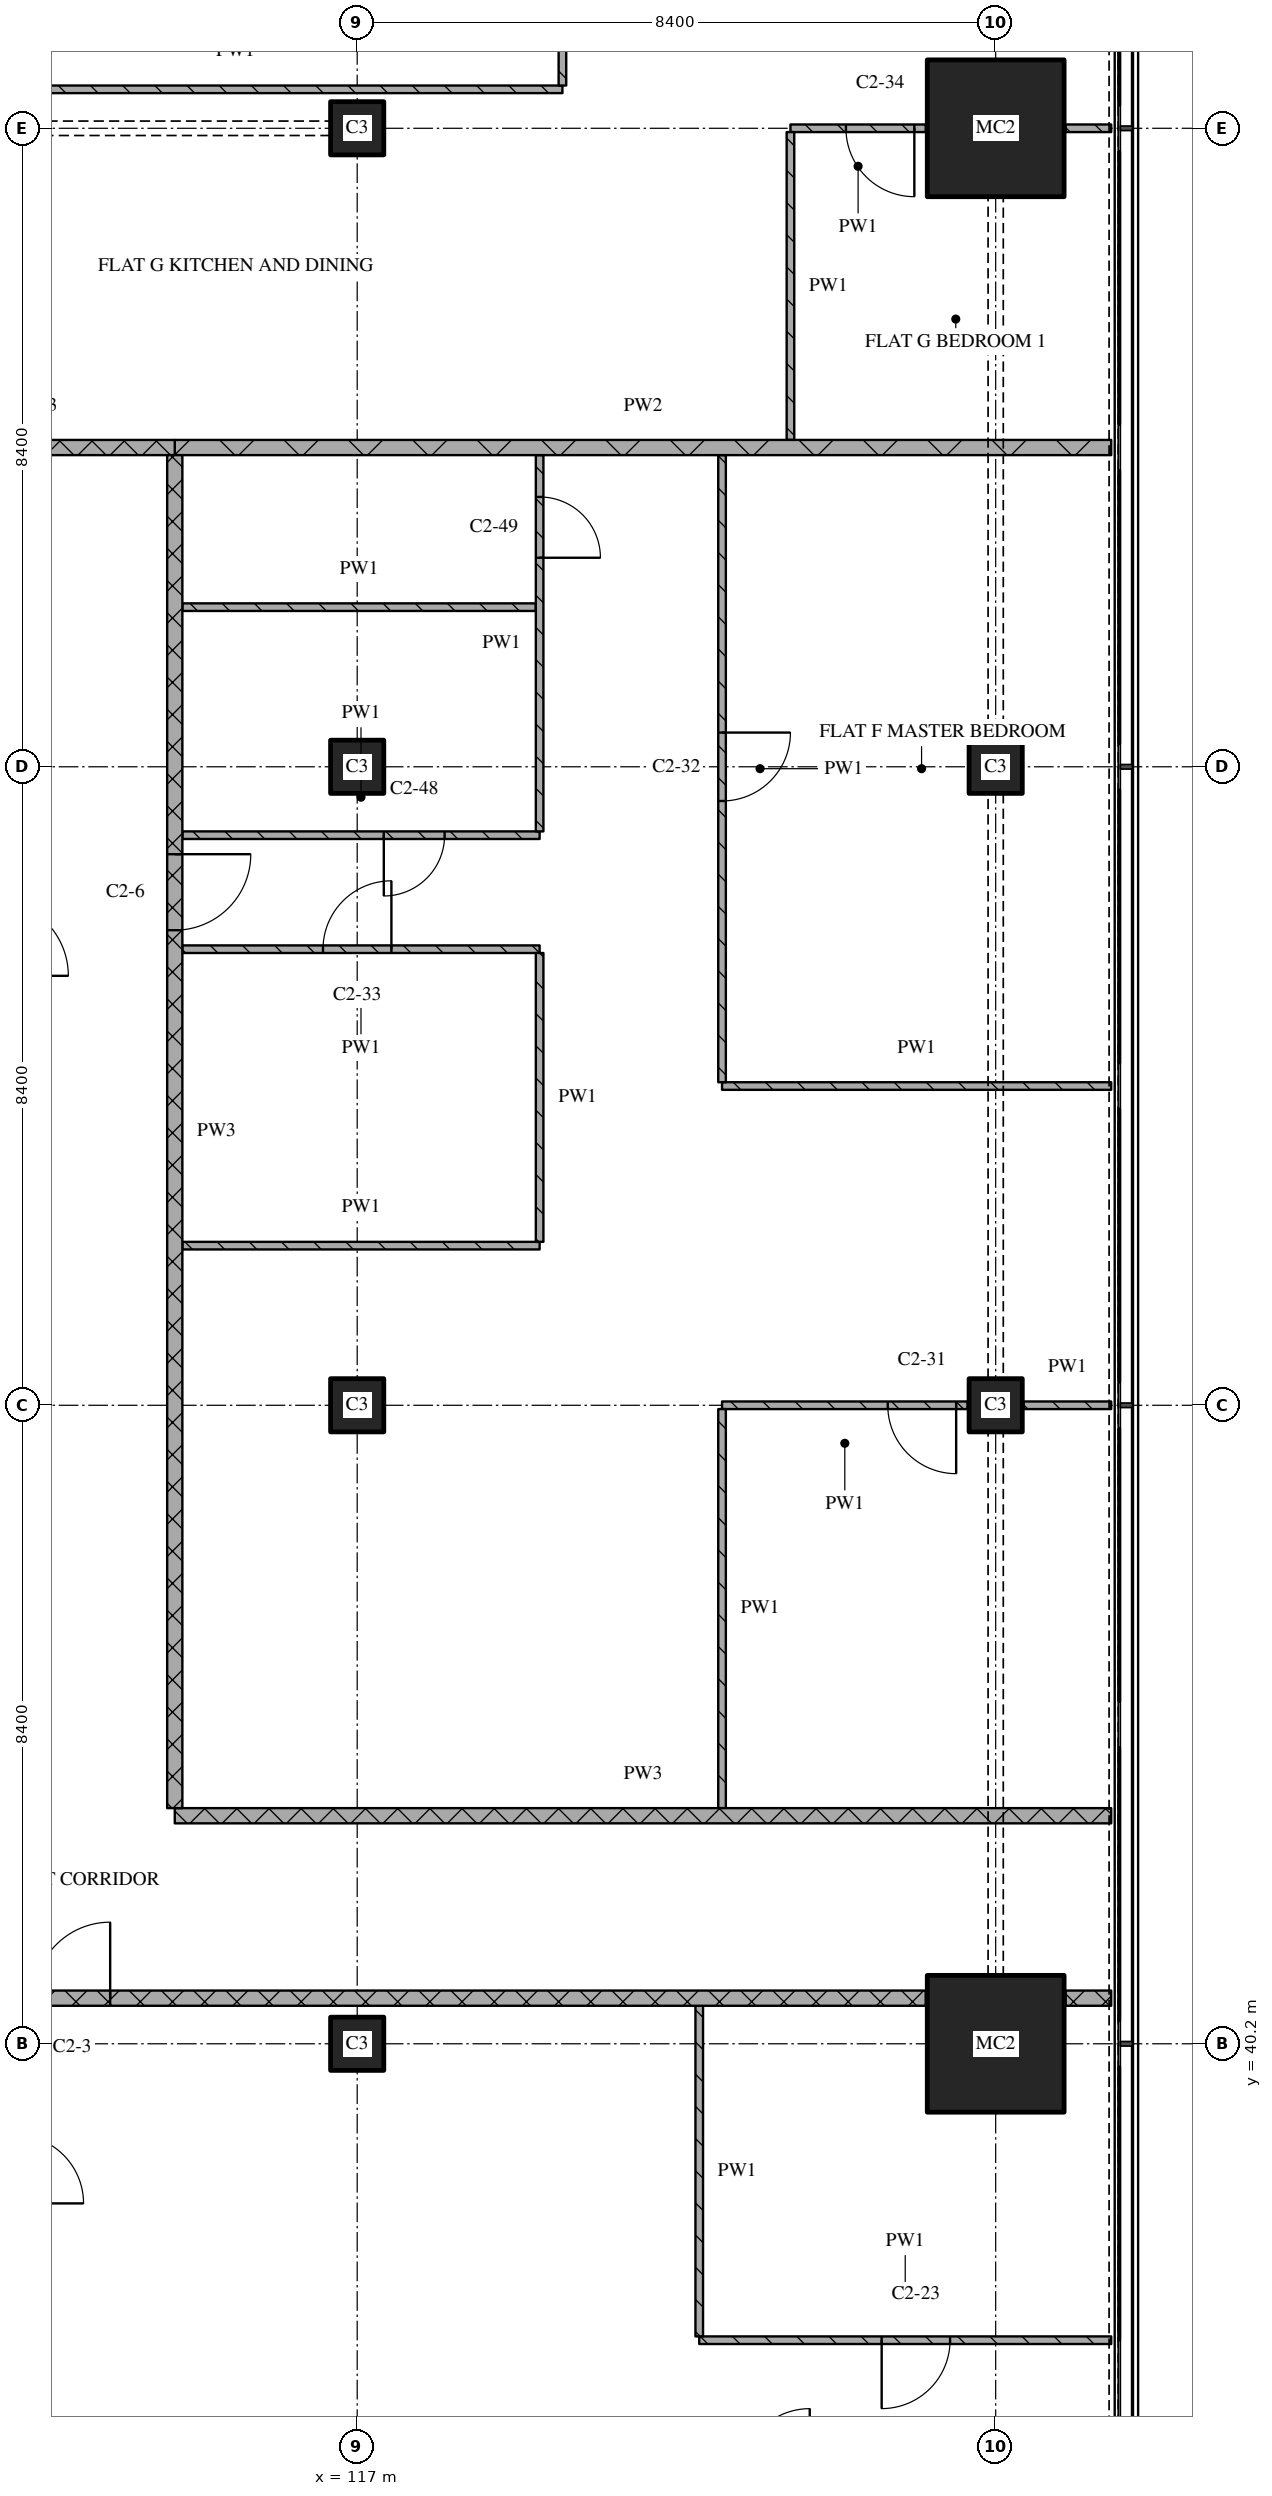
"""IFC4 building model, lengths in metres.
Left out: names, types, materials, properties, quantities, classifications, styles, units other than length and angle.
Written with IfcOpenShell. Run it as: python <this file> out.ifc"""

import sys

from ifc_helpers import new_model, si_unit, direction, frame, frame_2d, origin, origin_2d, place, context, subcontext, project, spatial, rectangle, extrude, element, fill, save


model = new_model("IFC4")
c1 = context("Model", 3, precision=1e-05, world=origin(), true_north=direction((0.0, 1.0)))
c2 = subcontext(c1, "Body", "Model", "MODEL_VIEW")
j1 = project(units=[si_unit("LENGTHUNIT", "METRE"), si_unit("PLANEANGLEUNIT", "RADIAN")], contexts=[c1])
p1 = place(None, origin())
s1 = spatial("IfcSite", under=j1, at=p1, CompositionType="ELEMENT")
p2 = place(p1, origin())
s2 = spatial("IfcBuilding", under=s1, at=p2, CompositionType="ELEMENT")
p3 = place(p2, frame((0.0, 0.0, 161.85)))
s3 = spatial("IfcBuildingStorey", under=s2, at=p3, CompositionType="ELEMENT", Elevation=161.85)
for number, where, z_axis, x_axis in (
    (1, (117.0, 40.2, 0.0), (0.0, 0.0, 1.0), (1.0, 0.0, 0.0)),
    (2, (117.0, 48.6, 0.0), (0.0, 0.0, 1.0), (1.0, 0.0, 0.0)),
    (3, (117.0, 57.0, 0.0), (0.0, 0.0, 1.0), (1.0, 0.0, 0.0)),
    (4, (117.0, 65.4, 0.0), (0.0, 0.0, 1.0), (1.0, 0.0, 0.0)),
):
    element("IfcColumn", number, at=place(p3, frame(where, z_axis=z_axis, x_axis=x_axis)), inside=s3, PredefinedType="COLUMN", context=c2, shape_type="SweptSolid", body=[
        extrude(rectangle(XDim=0.7, YDim=0.7, at=origin_2d()), origin(), (0.0, 0.0, 1.0), 3.6),
    ])
p4 = place(p3, frame((125.4, 40.2, 0.0), z_axis=(0.0, 0.0, 1.0), x_axis=(1.0, 0.0, 0.0)))
e5 = element("IfcColumn", 5, at=p4, inside=s3, PredefinedType="COLUMN", context=c2, shape_type="SweptSolid", body=[
    extrude(rectangle(XDim=1.8, YDim=1.8, at=origin_2d()), origin(), (0.0, 0.0, 1.0), 3.6),
])
for number, where, z_axis, x_axis in (
    (6, (125.4, 48.6, 0.0), (0.0, 0.0, 1.0), (1.0, 0.0, 0.0)),
    (7, (125.4, 57.0, 0.0), (0.0, 0.0, 1.0), (1.0, 0.0, 0.0)),
):
    element("IfcColumn", number, at=place(p3, frame(where, z_axis=z_axis, x_axis=x_axis)), inside=s3, PredefinedType="COLUMN", context=c2, shape_type="SweptSolid", body=[
        extrude(rectangle(XDim=0.7, YDim=0.7, at=origin_2d()), origin(), (0.0, 0.0, 1.0), 3.6),
    ])
p5 = place(p3, frame((125.4, 65.4, 0.0), z_axis=(0.0, 0.0, 1.0), x_axis=(1.0, 0.0, 0.0)))
e8 = element("IfcColumn", 8, at=p5, inside=s3, PredefinedType="COLUMN", context=c2, shape_type="SweptSolid", body=[
    extrude(rectangle(XDim=1.8, YDim=1.8, at=origin_2d()), origin(), (0.0, 0.0, 1.0), 3.6),
])
p6 = place(p3, frame((121.5, 36.3, 0.0), z_axis=(0.0, 0.0, 1.0), x_axis=(1.0, 0.0, 0.0)))
e9 = element("IfcWall", 9, at=p6, inside=s3, PredefinedType="PARTITIONING", context=c2, shape_type="SweptSolid", body=[
    extrude(rectangle(XDim=5.42, YDim=0.1, at=frame_2d((2.71, 0.0))), origin(), (0.0, 0.0, 1.0), 3.32),
])
p7 = place(p6, frame((2.4, 0.0, 0.0)))
e10 = element("IfcOpeningElement", 10, at=p7, cuts=e9, PredefinedType="OPENING", context=c2, shape_type="SweptSolid", body=[
    extrude(rectangle(XDim=0.9, YDim=2.1, at=frame_2d((0.45, 1.05))), frame((0.0, 0.06, 0.0), z_axis=(0.0, -1.0, 0.0), x_axis=(1.0, 0.0, 0.0)), (0.0, 0.0, 1.0), 0.12),
])
p8 = place(p3, frame((124.48, 40.8, 0.0), z_axis=(0.0, 0.0, 1.0), x_axis=(-1.0, 0.0, 0.0)))
e11 = element("IfcWall", 11, at=p8, inside=s3, PredefinedType="PARTITIONING", context=c2, shape_type="SweptSolid", body=[
    extrude(rectangle(XDim=24.28, YDim=0.2, at=frame_2d((12.14, 0.0))), origin(), (0.0, 0.0, 1.0), 3.32),
])
p9 = place(p8, frame((10.73, 0.0, 0.0)))
e12 = element("IfcOpeningElement", 12, at=p9, cuts=e11, PredefinedType="OPENING", context=c2, shape_type="SweptSolid", body=[
    extrude(rectangle(XDim=1.0, YDim=2.1, at=frame_2d((0.5, 1.05))), frame((0.0, 0.11, 0.0), z_axis=(0.0, -1.0, 0.0), x_axis=(1.0, 0.0, 0.0)), (0.0, 0.0, 1.0), 0.22),
])
p10 = place(p3, frame((126.32, 40.8, 0.0), z_axis=(0.0, 0.0, 1.0), x_axis=(1.0, 0.0, 0.0)))
e13 = element("IfcWall", 13, at=p10, inside=s3, PredefinedType="PARTITIONING", context=c2, shape_type="SweptSolid", body=[
    extrude(rectangle(XDim=0.6, YDim=0.2, at=frame_2d((0.3, 0.0))), origin(), (0.0, 0.0, 1.0), 3.32),
])
p11 = place(p3, frame((114.6, 43.2, 0.0), z_axis=(0.0, 0.0, 1.0), x_axis=(1.0, 0.0, 0.0)))
e14 = element("IfcWall", 14, at=p11, inside=s3, PredefinedType="PARTITIONING", context=c2, shape_type="SweptSolid", body=[
    extrude(rectangle(XDim=12.32, YDim=0.2, at=frame_2d((6.16, 0.0))), origin(), (0.0, 0.0, 1.0), 3.32),
])
p12 = place(p3, frame((125.03, 48.6, 0.0), z_axis=(0.0, 0.0, 1.0), x_axis=(-1.0, 0.0, 0.0)))
e15 = element("IfcWall", 15, at=p12, inside=s3, PredefinedType="PARTITIONING", context=c2, shape_type="SweptSolid", body=[
    extrude(rectangle(XDim=3.23, YDim=0.1, at=frame_2d((1.615, 0.0))), origin(), (0.0, 0.0, 1.0), 3.32),
])
p13 = place(p12, frame((0.15, 0.0, 0.0)))
e16 = element("IfcOpeningElement", 16, at=p13, cuts=e15, PredefinedType="OPENING", context=c2, shape_type="SweptSolid", body=[
    extrude(rectangle(XDim=0.9, YDim=2.1, at=frame_2d((0.45, 1.05))), frame((0.0, 0.06, 0.0), z_axis=(0.0, -1.0, 0.0), x_axis=(1.0, 0.0, 0.0)), (0.0, 0.0, 1.0), 0.12),
])
p14 = place(p3, frame((125.77, 48.6, 0.0), z_axis=(0.0, 0.0, 1.0), x_axis=(1.0, 0.0, 0.0)))
e17 = element("IfcWall", 17, at=p14, inside=s3, PredefinedType="PARTITIONING", context=c2, shape_type="SweptSolid", body=[
    extrude(rectangle(XDim=1.15, YDim=0.1, at=frame_2d((0.575, 0.0))), origin(), (0.0, 0.0, 1.0), 3.32),
])
p15 = place(p3, frame((114.7, 50.7, 0.0), z_axis=(0.0, 0.0, 1.0), x_axis=(1.0, 0.0, 0.0)))
e18 = element("IfcWall", 18, at=p15, inside=s3, PredefinedType="PARTITIONING", context=c2, shape_type="SweptSolid", body=[
    extrude(rectangle(XDim=4.7, YDim=0.1, at=frame_2d((2.35, 0.0))), origin(), (0.0, 0.0, 1.0), 3.32),
])
p16 = place(p3, frame((121.8, 52.8, 0.0), z_axis=(0.0, 0.0, 1.0), x_axis=(1.0, 0.0, 0.0)))
e19 = element("IfcWall", 19, at=p16, inside=s3, PredefinedType="PARTITIONING", context=c2, shape_type="SweptSolid", body=[
    extrude(rectangle(XDim=5.12, YDim=0.1, at=frame_2d((2.56, 0.0))), origin(), (0.0, 0.0, 1.0), 3.32),
])
p17 = place(p3, frame((119.4, 54.6, 0.0), z_axis=(0.0, 0.0, 1.0), x_axis=(-1.0, 0.0, 0.0)))
e20 = element("IfcWall", 20, at=p17, inside=s3, PredefinedType="PARTITIONING", context=c2, shape_type="SweptSolid", body=[
    extrude(rectangle(XDim=4.7, YDim=0.1, at=frame_2d((2.35, 0.0))), origin(), (0.0, 0.0, 1.0), 3.32),
])
p18 = place(p17, frame((1.95, 0.0, 0.0)))
e21 = element("IfcOpeningElement", 21, at=p18, cuts=e20, PredefinedType="OPENING", context=c2, shape_type="SweptSolid", body=[
    extrude(rectangle(XDim=0.9, YDim=2.1, at=frame_2d((0.45, 1.05))), frame((0.0, 0.06, 0.0), z_axis=(0.0, -1.0, 0.0), x_axis=(1.0, 0.0, 0.0)), (0.0, 0.0, 1.0), 0.12),
])
p19 = place(p3, frame((114.7, 56.1, 0.0), z_axis=(0.0, 0.0, 1.0), x_axis=(1.0, 0.0, 0.0)))
e22 = element("IfcWall", 22, at=p19, inside=s3, PredefinedType="PARTITIONING", context=c2, shape_type="SweptSolid", body=[
    extrude(rectangle(XDim=4.7, YDim=0.1, at=frame_2d((2.35, 0.0))), origin(), (0.0, 0.0, 1.0), 3.32),
])
p20 = place(p19, frame((2.65, 0.0, 0.0)))
e23 = element("IfcOpeningElement", 23, at=p20, cuts=e22, PredefinedType="OPENING", context=c2, shape_type="SweptSolid", body=[
    extrude(rectangle(XDim=0.8, YDim=2.1, at=frame_2d((0.4, 1.05))), frame((0.0, 0.06, 0.0), z_axis=(0.0, -1.0, 0.0), x_axis=(1.0, 0.0, 0.0)), (0.0, 0.0, 1.0), 0.12),
])
p21 = place(p3, frame((114.7, 59.1, 0.0), z_axis=(0.0, 0.0, 1.0), x_axis=(1.0, 0.0, 0.0)))
e24 = element("IfcWall", 24, at=p21, inside=s3, PredefinedType="PARTITIONING", context=c2, shape_type="SweptSolid", body=[
    extrude(rectangle(XDim=4.65, YDim=0.1, at=frame_2d((2.325, 0.0))), origin(), (0.0, 0.0, 1.0), 3.32),
])
p22 = place(p3, frame((111.0, 61.2, 0.0), z_axis=(0.0, 0.0, 1.0), x_axis=(1.0, 0.0, 0.0)))
e25 = element("IfcWall", 25, at=p22, inside=s3, PredefinedType="PARTITIONING", context=c2, shape_type="SweptSolid", body=[
    extrude(rectangle(XDim=3.6, YDim=0.2, at=frame_2d((1.8, 0.0))), origin(), (0.0, 0.0, 1.0), 3.32),
])
p23 = place(p3, frame((114.6, 61.2, 0.0), z_axis=(0.0, 0.0, 1.0), x_axis=(1.0, 0.0, 0.0)))
e26 = element("IfcWall", 26, at=p23, inside=s3, PredefinedType="PARTITIONING", context=c2, shape_type="SweptSolid", body=[
    extrude(rectangle(XDim=12.32, YDim=0.2, at=frame_2d((6.16, 0.0))), origin(), (0.0, 0.0, 1.0), 3.32),
])
p24 = place(p3, frame((124.48, 65.4, 0.0), z_axis=(0.0, 0.0, 1.0), x_axis=(-1.0, 0.0, 0.0)))
e27 = element("IfcWall", 27, at=p24, inside=s3, PredefinedType="PARTITIONING", context=c2, shape_type="SweptSolid", body=[
    extrude(rectangle(XDim=1.78, YDim=0.1, at=frame_2d((0.89, 0.0))), origin(), (0.0, 0.0, 1.0), 3.32),
])
p25 = place(p24, frame((0.15, 0.0, 0.0)))
e28 = element("IfcOpeningElement", 28, at=p25, cuts=e27, PredefinedType="OPENING", context=c2, shape_type="SweptSolid", body=[
    extrude(rectangle(XDim=0.9, YDim=2.1, at=frame_2d((0.45, 1.05))), frame((0.0, 0.06, 0.0), z_axis=(0.0, -1.0, 0.0), x_axis=(1.0, 0.0, 0.0)), (0.0, 0.0, 1.0), 0.12),
])
p26 = place(p3, frame((126.32, 65.4, 0.0), z_axis=(0.0, 0.0, 1.0), x_axis=(1.0, 0.0, 0.0)))
e29 = element("IfcWall", 29, at=p26, inside=s3, PredefinedType="PARTITIONING", context=c2, shape_type="SweptSolid", body=[
    extrude(rectangle(XDim=0.6, YDim=0.1, at=frame_2d((0.3, 0.0))), origin(), (0.0, 0.0, 1.0), 3.32),
])
p27 = place(p3, frame((111.1, 65.913, 0.0), z_axis=(0.0, 0.0, 1.0), x_axis=(1.0, 0.0, 0.0)))
e30 = element("IfcWall", 30, at=p27, inside=s3, PredefinedType="PARTITIONING", context=c2, shape_type="SweptSolid", body=[
    extrude(rectangle(XDim=8.6, YDim=0.1, at=frame_2d((4.3, 0.0))), origin(), (0.0, 0.0, 1.0), 3.32),
])
p28 = place(p3, frame((114.6, 61.1, 0.0), z_axis=(0.0, 0.0, 1.0), x_axis=(0.0, -1.0, 0.0)))
e31 = element("IfcWall", 31, at=p28, inside=s3, PredefinedType="PARTITIONING", context=c2, shape_type="SweptSolid", body=[
    extrude(rectangle(XDim=17.8, YDim=0.2, at=frame_2d((8.9, 0.0))), origin(), (0.0, 0.0, 1.0), 3.32),
])
p29 = place(p28, frame((5.25, 0.0, 0.0)))
e32 = element("IfcOpeningElement", 32, at=p29, cuts=e31, PredefinedType="OPENING", context=c2, shape_type="SweptSolid", body=[
    extrude(rectangle(XDim=1.0, YDim=2.1, at=frame_2d((0.5, 1.05))), frame((0.0, 0.11, 0.0), z_axis=(0.0, -1.0, 0.0), x_axis=(1.0, 0.0, 0.0)), (0.0, 0.0, 1.0), 0.22),
])
p30 = place(p3, frame((119.4, 54.55, 0.0), z_axis=(0.0, 0.0, 1.0), x_axis=(0.0, -1.0, 0.0)))
e33 = element("IfcWall", 33, at=p30, inside=s3, PredefinedType="PARTITIONING", context=c2, shape_type="SweptSolid", body=[
    extrude(rectangle(XDim=3.8, YDim=0.1, at=frame_2d((1.9, 0.0))), origin(), (0.0, 0.0, 1.0), 3.32),
])
p31 = place(p3, frame((119.4, 56.15, 0.0), z_axis=(0.0, 0.0, 1.0), x_axis=(0.0, 1.0, 0.0)))
e34 = element("IfcWall", 34, at=p31, inside=s3, PredefinedType="PARTITIONING", context=c2, shape_type="SweptSolid", body=[
    extrude(rectangle(XDim=4.95, YDim=0.1, at=frame_2d((2.475, 0.0))), origin(), (0.0, 0.0, 1.0), 3.32),
])
p32 = place(p31, frame((3.6, 0.0, 0.0)))
e35 = element("IfcOpeningElement", 35, at=p32, cuts=e34, PredefinedType="OPENING", context=c2, shape_type="SweptSolid", body=[
    extrude(rectangle(XDim=0.8, YDim=2.1, at=frame_2d((0.4, 1.05))), frame((0.0, 0.06, 0.0), z_axis=(0.0, -1.0, 0.0), x_axis=(1.0, 0.0, 0.0)), (0.0, 0.0, 1.0), 0.12),
])
p33 = place(p3, frame((119.7, 69.85, 0.0), z_axis=(0.0, 0.0, 1.0), x_axis=(0.0, -1.0, 0.0)))
e36 = element("IfcWall", 36, at=p33, inside=s3, PredefinedType="PARTITIONING", context=c2, shape_type="SweptSolid", body=[
    extrude(rectangle(XDim=3.887, YDim=0.1, at=frame_2d((1.944, 0.0))), origin(), (0.0, 0.0, 1.0), 3.32),
])
p34 = place(p3, frame((121.5, 40.7, 0.0), z_axis=(0.0, 0.0, 1.0), x_axis=(0.0, -1.0, 0.0)))
e37 = element("IfcWall", 37, at=p34, inside=s3, PredefinedType="PARTITIONING", context=c2, shape_type="SweptSolid", body=[
    extrude(rectangle(XDim=4.35, YDim=0.1, at=frame_2d((2.175, 0.0))), origin(), (0.0, 0.0, 1.0), 3.32),
])
p35 = place(p3, frame((121.8, 48.55, 0.0), z_axis=(0.0, 0.0, 1.0), x_axis=(0.0, -1.0, 0.0)))
e38 = element("IfcWall", 38, at=p35, inside=s3, PredefinedType="PARTITIONING", context=c2, shape_type="SweptSolid", body=[
    extrude(rectangle(XDim=5.25, YDim=0.1, at=frame_2d((2.625, 0.0))), origin(), (0.0, 0.0, 1.0), 3.32),
])
p36 = place(p3, frame((121.8, 61.1, 0.0), z_axis=(0.0, 0.0, 1.0), x_axis=(0.0, -1.0, 0.0)))
e39 = element("IfcWall", 39, at=p36, inside=s3, PredefinedType="PARTITIONING", context=c2, shape_type="SweptSolid", body=[
    extrude(rectangle(XDim=8.25, YDim=0.1, at=frame_2d((4.125, 0.0))), origin(), (0.0, 0.0, 1.0), 3.32),
])
p37 = place(p36, frame((3.65, 0.0, 0.0)))
e40 = element("IfcOpeningElement", 40, at=p37, cuts=e39, PredefinedType="OPENING", context=c2, shape_type="SweptSolid", body=[
    extrude(rectangle(XDim=0.9, YDim=2.1, at=frame_2d((0.45, 1.05))), frame((0.0, 0.06, 0.0), z_axis=(0.0, -1.0, 0.0), x_axis=(1.0, 0.0, 0.0)), (0.0, 0.0, 1.0), 0.12),
])
p38 = place(p3, frame((122.7, 65.35, 0.0), z_axis=(0.0, 0.0, 1.0), x_axis=(0.0, -1.0, 0.0)))
e41 = element("IfcWall", 41, at=p38, inside=s3, PredefinedType="PARTITIONING", context=c2, shape_type="SweptSolid", body=[
    extrude(rectangle(XDim=4.05, YDim=0.1, at=frame_2d((2.025, 0.0))), origin(), (0.0, 0.0, 1.0), 3.32),
])
p39 = place(p7, origin())
e42 = element("IfcDoor", 42, at=p39, inside=s3, OperationType="SINGLE_SWING_RIGHT", PredefinedType="DOOR", context=c2, shape_type="SweptSolid", body=[
    extrude(rectangle(XDim=0.9, YDim=2.1, at=frame_2d((0.45, 1.05))), frame((0.0, 0.025, 0.0), z_axis=(0.0, -1.0, 0.0), x_axis=(1.0, 0.0, 0.0)), (0.0, 0.0, 1.0), 0.05),
])
fill(e10, e42)
p40 = place(p9, origin())
e43 = element("IfcDoor", 43, at=p40, inside=s3, OperationType="SINGLE_SWING_RIGHT", PredefinedType="DOOR", context=c2, shape_type="SweptSolid", body=[
    extrude(rectangle(XDim=1.0, YDim=2.1, at=frame_2d((0.5, 1.05))), frame((0.0, 0.025, 0.0), z_axis=(0.0, -1.0, 0.0), x_axis=(1.0, 0.0, 0.0)), (0.0, 0.0, 1.0), 0.05),
])
fill(e12, e43)
p41 = place(p13, origin())
e44 = element("IfcDoor", 44, at=p41, inside=s3, OperationType="SINGLE_SWING_LEFT", PredefinedType="DOOR", context=c2, shape_type="SweptSolid", body=[
    extrude(rectangle(XDim=0.9, YDim=2.1, at=frame_2d((0.45, 1.05))), frame((0.0, 0.025, 0.0), z_axis=(0.0, -1.0, 0.0), x_axis=(1.0, 0.0, 0.0)), (0.0, 0.0, 1.0), 0.05),
])
fill(e16, e44)
p42 = place(p18, origin())
e45 = element("IfcDoor", 45, at=p42, inside=s3, OperationType="SINGLE_SWING_RIGHT", PredefinedType="DOOR", context=c2, shape_type="SweptSolid", body=[
    extrude(rectangle(XDim=0.9, YDim=2.1, at=frame_2d((0.45, 1.05))), frame((0.0, 0.025, 0.0), z_axis=(0.0, -1.0, 0.0), x_axis=(1.0, 0.0, 0.0)), (0.0, 0.0, 1.0), 0.05),
])
fill(e21, e45)
p43 = place(p20, origin())
e46 = element("IfcDoor", 46, at=p43, inside=s3, OperationType="SINGLE_SWING_RIGHT", PredefinedType="DOOR", context=c2, shape_type="SweptSolid", body=[
    extrude(rectangle(XDim=0.8, YDim=2.1, at=frame_2d((0.4, 1.05))), frame((0.0, 0.025, 0.0), z_axis=(0.0, -1.0, 0.0), x_axis=(1.0, 0.0, 0.0)), (0.0, 0.0, 1.0), 0.05),
])
fill(e23, e46)
p44 = place(p25, origin())
e47 = element("IfcDoor", 47, at=p44, inside=s3, OperationType="SINGLE_SWING_LEFT", PredefinedType="DOOR", context=c2, shape_type="SweptSolid", body=[
    extrude(rectangle(XDim=0.9, YDim=2.1, at=frame_2d((0.45, 1.05))), frame((0.0, 0.025, 0.0), z_axis=(0.0, -1.0, 0.0), x_axis=(1.0, 0.0, 0.0)), (0.0, 0.0, 1.0), 0.05),
])
fill(e28, e47)
p45 = place(p29, origin())
e48 = element("IfcDoor", 48, at=p45, inside=s3, OperationType="SINGLE_SWING_LEFT", PredefinedType="DOOR", context=c2, shape_type="SweptSolid", body=[
    extrude(rectangle(XDim=1.0, YDim=2.1, at=frame_2d((0.5, 1.05))), frame((0.0, 0.025, 0.0), z_axis=(0.0, -1.0, 0.0), x_axis=(1.0, 0.0, 0.0)), (0.0, 0.0, 1.0), 0.05),
])
fill(e32, e48)
p46 = place(p32, origin())
e49 = element("IfcDoor", 49, at=p46, inside=s3, OperationType="SINGLE_SWING_RIGHT", PredefinedType="DOOR", context=c2, shape_type="SweptSolid", body=[
    extrude(rectangle(XDim=0.8, YDim=2.1, at=frame_2d((0.4, 1.05))), frame((0.0, 0.025, 0.0), z_axis=(0.0, -1.0, 0.0), x_axis=(1.0, 0.0, 0.0)), (0.0, 0.0, 1.0), 0.05),
])
fill(e35, e49)
p47 = place(p37, origin())
e50 = element("IfcDoor", 50, at=p47, inside=s3, OperationType="SINGLE_SWING_LEFT", PredefinedType="DOOR", context=c2, shape_type="SweptSolid", body=[
    extrude(rectangle(XDim=0.9, YDim=2.1, at=frame_2d((0.45, 1.05))), frame((0.0, 0.025, 0.0), z_axis=(0.0, -1.0, 0.0), x_axis=(1.0, 0.0, 0.0)), (0.0, 0.0, 1.0), 0.05),
])
fill(e40, e50)
save(model, sys.argv[1])
